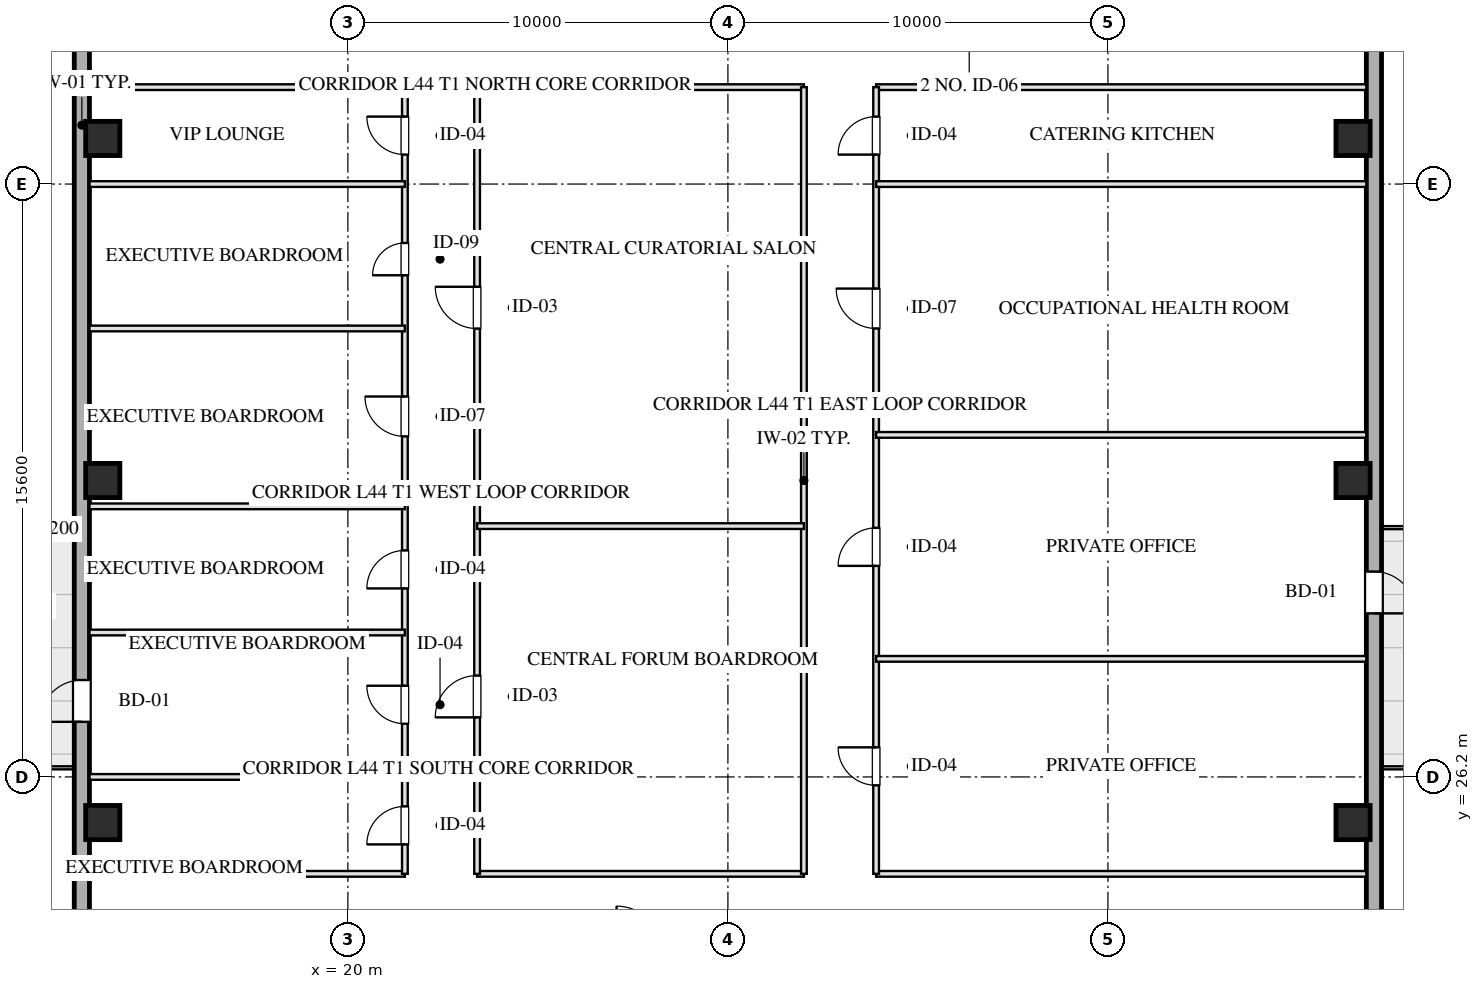
"""IFC4 building model, lengths in metres.
Left out: names, types, materials, properties, quantities, classifications, styles, units other than length and angle.
Written with IfcOpenShell. Run it as: python <this file> out.ifc"""

import sys

from ifc_helpers import new_model, si_unit, direction, frame, frame_2d, origin, origin_2d, place, context, subcontext, project, spatial, rectangle, hollow_rectangle, extrude, element, fill, save


model = new_model("IFC4")
c1 = context("Model", 3, precision=1e-05, world=origin(), true_north=direction((0.0, 1.0)))
c2 = subcontext(c1, "Body", "Model", "MODEL_VIEW")
j1 = project(units=[si_unit("LENGTHUNIT", "METRE"), si_unit("PLANEANGLEUNIT", "RADIAN")], contexts=[c1])
p1 = place(None, origin())
s1 = spatial("IfcSite", under=j1, at=p1, CompositionType="ELEMENT")
p2 = place(p1, origin())
s2 = spatial("IfcBuilding", under=s1, at=p2, CompositionType="ELEMENT")
p3 = place(p2, frame((0.0, 0.0, 166.75)))
s3 = spatial("IfcBuildingStorey", under=s2, at=p3, CompositionType="ELEMENT", Elevation=166.75)
for number, where, z_axis, x_axis in (
    (1, (13.55, 25.0, 0.0), (0.0, 0.0, 1.0), (1.0, 0.0, 0.0)),
    (2, (13.55, 34.0, 0.0), (0.0, 0.0, 1.0), (1.0, 0.0, 0.0)),
    (3, (13.55, 43.0, 0.0), (0.0, 0.0, 1.0), (1.0, 0.0, 0.0)),
    (4, (46.45, 25.0, 0.0), (0.0, 0.0, 1.0), (1.0, 0.0, 0.0)),
    (5, (46.45, 34.0, 0.0), (0.0, 0.0, 1.0), (1.0, 0.0, 0.0)),
    (6, (46.45, 43.0, 0.0), (0.0, 0.0, 1.0), (1.0, 0.0, 0.0)),
):
    element("IfcColumn", number, at=place(p3, frame(where, z_axis=z_axis, x_axis=x_axis)), inside=s3, PredefinedType="COLUMN", context=c2, shape_type="SweptSolid", body=[
        extrude(hollow_rectangle(XDim=0.9, YDim=0.9, WallThickness=0.032, at=origin_2d()), origin(), (0.0, 0.0, 1.0), 3.451),
    ])
p4 = place(p3, frame((13.0, 10.8, 0.0), z_axis=(0.0, 0.0, 1.0), x_axis=(0.0, 1.0, 0.0)))
e7 = element("IfcWall", 7, at=p4, inside=s3, PredefinedType="SOLIDWALL", context=c2, shape_type="SweptSolid", body=[
    extrude(rectangle(XDim=46.4, YDim=0.4, at=frame_2d((23.2, 0.0))), origin(), (0.0, 0.0, 1.0), 2.61),
])
p5 = place(p4, frame((16.85, 0.0, 0.0)))
e8 = element("IfcOpeningElement", 8, at=p5, cuts=e7, PredefinedType="OPENING", context=c2, shape_type="SweptSolid", body=[
    extrude(rectangle(XDim=1.1, YDim=2.15, at=frame_2d((0.55, 1.075))), frame((0.0, 0.21, 0.0), z_axis=(0.0, -1.0, 0.0), x_axis=(1.0, 0.0, 0.0)), (0.0, 0.0, 1.0), 0.42),
])
p6 = place(p3, frame((47.0, 57.2, 0.0), z_axis=(0.0, 0.0, 1.0), x_axis=(0.0, -1.0, 0.0)))
e9 = element("IfcWall", 9, at=p6, inside=s3, PredefinedType="SOLIDWALL", context=c2, shape_type="SweptSolid", body=[
    extrude(rectangle(XDim=46.4, YDim=0.4, at=frame_2d((23.2, 0.0))), origin(), (0.0, 0.0, 1.0), 2.61),
])
p7 = place(p6, frame((25.596, 0.0, 0.0)))
e10 = element("IfcOpeningElement", 10, at=p7, cuts=e9, PredefinedType="OPENING", context=c2, shape_type="SweptSolid", body=[
    extrude(rectangle(XDim=1.1, YDim=2.15, at=frame_2d((0.55, 1.075))), frame((0.0, 0.21, 0.0), z_axis=(0.0, -1.0, 0.0), x_axis=(1.0, 0.0, 0.0)), (0.0, 0.0, 1.0), 0.42),
])
p8 = place(p3, frame((13.2, 23.65, 0.0), z_axis=(0.0, 0.0, 1.0), x_axis=(1.0, 0.0, 0.0)))
e11 = element("IfcWall", 11, at=p8, inside=s3, PredefinedType="PARTITIONING", context=c2, shape_type="SweptSolid", body=[
    extrude(rectangle(XDim=8.3, YDim=0.15, at=frame_2d((4.15, 0.0))), origin(), (0.0, 0.0, 1.0), 3.175),
])
p9 = place(p3, frame((23.4, 23.65, 0.0), z_axis=(0.0, 0.0, 1.0), x_axis=(1.0, 0.0, 0.0)))
e12 = element("IfcWall", 12, at=p9, inside=s3, PredefinedType="PARTITIONING", context=c2, shape_type="SweptSolid", body=[
    extrude(rectangle(XDim=8.6, YDim=0.15, at=frame_2d((4.3, 0.0))), origin(), (0.0, 0.0, 1.0), 3.175),
])
p10 = place(p3, frame((33.9, 23.65, 0.0), z_axis=(0.0, 0.0, 1.0), x_axis=(1.0, 0.0, 0.0)))
e13 = element("IfcWall", 13, at=p10, inside=s3, PredefinedType="PARTITIONING", context=c2, shape_type="SweptSolid", body=[
    extrude(rectangle(XDim=12.9, YDim=0.15, at=frame_2d((6.45, 0.0))), origin(), (0.0, 0.0, 1.0), 3.175),
])
p11 = place(p3, frame((13.2, 44.35, 0.0), z_axis=(0.0, 0.0, 1.0), x_axis=(1.0, 0.0, 0.0)))
e14 = element("IfcWall", 14, at=p11, inside=s3, PredefinedType="PARTITIONING", context=c2, shape_type="SweptSolid", body=[
    extrude(rectangle(XDim=8.3, YDim=0.15, at=frame_2d((4.15, 0.0))), origin(), (0.0, 0.0, 1.0), 3.175),
])
p12 = place(p3, frame((23.4, 44.35, 0.0), z_axis=(0.0, 0.0, 1.0), x_axis=(1.0, 0.0, 0.0)))
e15 = element("IfcWall", 15, at=p12, inside=s3, PredefinedType="PARTITIONING", context=c2, shape_type="SweptSolid", body=[
    extrude(rectangle(XDim=8.6, YDim=0.15, at=frame_2d((4.3, 0.0))), origin(), (0.0, 0.0, 1.0), 3.175),
])
p13 = place(p3, frame((33.9, 44.35, 0.0), z_axis=(0.0, 0.0, 1.0), x_axis=(1.0, 0.0, 0.0)))
e16 = element("IfcWall", 16, at=p13, inside=s3, PredefinedType="PARTITIONING", context=c2, shape_type="SweptSolid", body=[
    extrude(rectangle(XDim=12.9, YDim=0.15, at=frame_2d((6.45, 0.0))), origin(), (0.0, 0.0, 1.0), 3.175),
])
p14 = place(p3, frame((21.5, 23.65, 0.0), z_axis=(0.0, 0.0, 1.0), x_axis=(0.0, 1.0, 0.0)))
e17 = element("IfcWall", 17, at=p14, inside=s3, PredefinedType="PARTITIONING", context=c2, shape_type="SweptSolid", body=[
    extrude(rectangle(XDim=20.7, YDim=0.15, at=frame_2d((10.35, 0.0))), origin(), (0.0, 0.0, 1.0), 3.175),
])
p15 = place(p14, frame((0.775, 0.0, 0.0)))
e18 = element("IfcOpeningElement", 18, at=p15, cuts=e17, PredefinedType="OPENING", context=c2, shape_type="SweptSolid", body=[
    extrude(rectangle(XDim=1.0, YDim=2.05, at=frame_2d((0.5, 1.025))), frame((0.0, 0.085, 0.0), z_axis=(0.0, -1.0, 0.0), x_axis=(1.0, 0.0, 0.0)), (0.0, 0.0, 1.0), 0.17),
])
p16 = place(p14, frame((3.95, 0.0, 0.0)))
e19 = element("IfcOpeningElement", 19, at=p16, cuts=e17, PredefinedType="OPENING", context=c2, shape_type="SweptSolid", body=[
    extrude(rectangle(XDim=1.0, YDim=2.05, at=frame_2d((0.5, 1.025))), frame((0.0, 0.085, 0.0), z_axis=(0.0, -1.0, 0.0), x_axis=(1.0, 0.0, 0.0)), (0.0, 0.0, 1.0), 0.17),
])
p17 = place(p14, frame((7.51, 0.0, 0.0)))
e20 = element("IfcOpeningElement", 20, at=p17, cuts=e17, PredefinedType="OPENING", context=c2, shape_type="SweptSolid", body=[
    extrude(rectangle(XDim=1.0, YDim=2.05, at=frame_2d((0.5, 1.025))), frame((0.0, 0.085, 0.0), z_axis=(0.0, -1.0, 0.0), x_axis=(1.0, 0.0, 0.0)), (0.0, 0.0, 1.0), 0.17),
])
p18 = place(p14, frame((11.51, 0.0, 0.0)))
e21 = element("IfcOpeningElement", 21, at=p18, cuts=e17, PredefinedType="OPENING", context=c2, shape_type="SweptSolid", body=[
    extrude(rectangle(XDim=1.05, YDim=2.05, at=frame_2d((0.525, 1.025))), frame((0.0, 0.085, 0.0), z_axis=(0.0, -1.0, 0.0), x_axis=(1.0, 0.0, 0.0)), (0.0, 0.0, 1.0), 0.17),
])
p19 = place(p14, frame((15.75, 0.0, 0.0)))
e22 = element("IfcOpeningElement", 22, at=p19, cuts=e17, PredefinedType="OPENING", context=c2, shape_type="SweptSolid", body=[
    extrude(rectangle(XDim=0.85, YDim=2.05, at=frame_2d((0.425, 1.025))), frame((0.0, 0.085, 0.0), z_axis=(0.0, -1.0, 0.0), x_axis=(1.0, 0.0, 0.0)), (0.0, 0.0, 1.0), 0.17),
])
p20 = place(p14, frame((18.925, 0.0, 0.0)))
e23 = element("IfcOpeningElement", 23, at=p20, cuts=e17, PredefinedType="OPENING", context=c2, shape_type="SweptSolid", body=[
    extrude(rectangle(XDim=1.0, YDim=2.05, at=frame_2d((0.5, 1.025))), frame((0.0, 0.085, 0.0), z_axis=(0.0, -1.0, 0.0), x_axis=(1.0, 0.0, 0.0)), (0.0, 0.0, 1.0), 0.17),
])
p21 = place(p3, frame((23.4, 23.65, 0.0), z_axis=(0.0, 0.0, 1.0), x_axis=(0.0, 1.0, 0.0)))
e24 = element("IfcWall", 24, at=p21, inside=s3, PredefinedType="PARTITIONING", context=c2, shape_type="SweptSolid", body=[
    extrude(rectangle(XDim=20.7, YDim=0.15, at=frame_2d((10.35, 0.0))), origin(), (0.0, 0.0, 1.0), 3.175),
])
p22 = place(p21, frame((4.117, 0.0, 0.0)))
e25 = element("IfcOpeningElement", 25, at=p22, cuts=e24, PredefinedType="OPENING", context=c2, shape_type="SweptSolid", body=[
    extrude(rectangle(XDim=1.1, YDim=2.05, at=frame_2d((0.55, 1.025))), frame((0.0, 0.085, 0.0), z_axis=(0.0, -1.0, 0.0), x_axis=(1.0, 0.0, 0.0)), (0.0, 0.0, 1.0), 0.17),
])
p23 = place(p21, frame((14.347, 0.0, 0.0)))
e26 = element("IfcOpeningElement", 26, at=p23, cuts=e24, PredefinedType="OPENING", context=c2, shape_type="SweptSolid", body=[
    extrude(rectangle(XDim=1.1, YDim=2.05, at=frame_2d((0.55, 1.025))), frame((0.0, 0.085, 0.0), z_axis=(0.0, -1.0, 0.0), x_axis=(1.0, 0.0, 0.0)), (0.0, 0.0, 1.0), 0.17),
])
p24 = place(p3, frame((32.0, 23.65, 0.0), z_axis=(0.0, 0.0, 1.0), x_axis=(0.0, 1.0, 0.0)))
e27 = element("IfcWall", 27, at=p24, inside=s3, PredefinedType="PARTITIONING", context=c2, shape_type="SweptSolid", body=[
    extrude(rectangle(XDim=20.7, YDim=0.15, at=frame_2d((10.35, 0.0))), origin(), (0.0, 0.0, 1.0), 3.175),
])
p25 = place(p3, frame((33.9, 23.65, 0.0), z_axis=(0.0, 0.0, 1.0), x_axis=(0.0, 1.0, 0.0)))
e28 = element("IfcWall", 28, at=p25, inside=s3, PredefinedType="PARTITIONING", context=c2, shape_type="SweptSolid", body=[
    extrude(rectangle(XDim=20.7, YDim=0.15, at=frame_2d((10.35, 0.0))), origin(), (0.0, 0.0, 1.0), 3.175),
])
p26 = place(p25, frame((2.329, 0.0, 0.0)))
e29 = element("IfcOpeningElement", 29, at=p26, cuts=e28, PredefinedType="OPENING", context=c2, shape_type="SweptSolid", body=[
    extrude(rectangle(XDim=1.0, YDim=2.05, at=frame_2d((0.5, 1.025))), frame((0.0, 0.085, 0.0), z_axis=(0.0, -1.0, 0.0), x_axis=(1.0, 0.0, 0.0)), (0.0, 0.0, 1.0), 0.17),
])
p27 = place(p25, frame((8.104, 0.0, 0.0)))
e30 = element("IfcOpeningElement", 30, at=p27, cuts=e28, PredefinedType="OPENING", context=c2, shape_type="SweptSolid", body=[
    extrude(rectangle(XDim=1.0, YDim=2.05, at=frame_2d((0.5, 1.025))), frame((0.0, 0.085, 0.0), z_axis=(0.0, -1.0, 0.0), x_axis=(1.0, 0.0, 0.0)), (0.0, 0.0, 1.0), 0.17),
])
p28 = place(p25, frame((14.35, 0.0, 0.0)))
e31 = element("IfcOpeningElement", 31, at=p28, cuts=e28, PredefinedType="OPENING", context=c2, shape_type="SweptSolid", body=[
    extrude(rectangle(XDim=1.05, YDim=2.05, at=frame_2d((0.525, 1.025))), frame((0.0, 0.085, 0.0), z_axis=(0.0, -1.0, 0.0), x_axis=(1.0, 0.0, 0.0)), (0.0, 0.0, 1.0), 0.17),
])
p29 = place(p25, frame((18.925, 0.0, 0.0)))
e32 = element("IfcOpeningElement", 32, at=p29, cuts=e28, PredefinedType="OPENING", context=c2, shape_type="SweptSolid", body=[
    extrude(rectangle(XDim=1.0, YDim=2.05, at=frame_2d((0.5, 1.025))), frame((0.0, 0.085, 0.0), z_axis=(0.0, -1.0, 0.0), x_axis=(1.0, 0.0, 0.0)), (0.0, 0.0, 1.0), 0.17),
])
p30 = place(p3, frame((23.4, 32.8, 0.0), z_axis=(0.0, 0.0, 1.0), x_axis=(1.0, 0.0, 0.0)))
e33 = element("IfcWall", 33, at=p30, inside=s3, PredefinedType="PARTITIONING", context=c2, shape_type="SweptSolid", body=[
    extrude(rectangle(XDim=8.6, YDim=0.15, at=frame_2d((4.3, 0.0))), origin(), (0.0, 0.0, 1.0), 3.175),
])
for number, where, z_axis, x_axis in (
    (34, (13.2, 26.2, 0.0), (0.0, 0.0, 1.0), (1.0, 0.0, 0.0)),
    (35, (13.2, 30.0, 0.0), (0.0, 0.0, 1.0), (1.0, 0.0, 0.0)),
    (36, (13.2, 33.32, 0.0), (0.0, 0.0, 1.0), (1.0, 0.0, 0.0)),
    (37, (13.2, 38.0, 0.0), (0.0, 0.0, 1.0), (1.0, 0.0, 0.0)),
    (38, (13.2, 41.8, 0.0), (0.0, 0.0, 1.0), (1.0, 0.0, 0.0)),
):
    element("IfcWall", number, at=place(p3, frame(where, z_axis=z_axis, x_axis=x_axis)), inside=s3, PredefinedType="PARTITIONING", context=c2, shape_type="SweptSolid", body=[
        extrude(rectangle(XDim=8.3, YDim=0.15, at=frame_2d((4.15, 0.0))), origin(), (0.0, 0.0, 1.0), 3.175),
    ])
for number, where, z_axis, x_axis in (
    (39, (33.9, 29.307, 0.0), (0.0, 0.0, 1.0), (1.0, 0.0, 0.0)),
    (40, (33.9, 35.2, 0.0), (0.0, 0.0, 1.0), (1.0, 0.0, 0.0)),
    (41, (33.9, 41.8, 0.0), (0.0, 0.0, 1.0), (1.0, 0.0, 0.0)),
):
    element("IfcWall", number, at=place(p3, frame(where, z_axis=z_axis, x_axis=x_axis)), inside=s3, PredefinedType="PARTITIONING", context=c2, shape_type="SweptSolid", body=[
        extrude(rectangle(XDim=12.9, YDim=0.15, at=frame_2d((6.45, 0.0))), origin(), (0.0, 0.0, 1.0), 3.175),
    ])
p31 = place(p5, origin())
e42 = element("IfcDoor", 42, at=p31, inside=s3, OperationType="SINGLE_SWING_LEFT", PredefinedType="DOOR", context=c2, shape_type="SweptSolid", body=[
    extrude(rectangle(XDim=1.1, YDim=2.15, at=frame_2d((0.55, 1.075))), frame((0.0, 0.025, 0.0), z_axis=(0.0, -1.0, 0.0), x_axis=(1.0, 0.0, 0.0)), (0.0, 0.0, 1.0), 0.05),
])
fill(e8, e42)
p32 = place(p7, origin())
e43 = element("IfcDoor", 43, at=p32, inside=s3, OperationType="SINGLE_SWING_RIGHT", PredefinedType="DOOR", context=c2, shape_type="SweptSolid", body=[
    extrude(rectangle(XDim=1.1, YDim=2.15, at=frame_2d((0.55, 1.075))), frame((0.0, 0.025, 0.0), z_axis=(0.0, -1.0, 0.0), x_axis=(1.0, 0.0, 0.0)), (0.0, 0.0, 1.0), 0.05),
])
fill(e10, e43)
p33 = place(p15, origin())
e44 = element("IfcDoor", 44, at=p33, inside=s3, OperationType="SINGLE_SWING_LEFT", PredefinedType="DOOR", context=c2, shape_type="SweptSolid", body=[
    extrude(rectangle(XDim=1.0, YDim=2.05, at=frame_2d((0.5, 1.025))), frame((0.0, 0.025, 0.0), z_axis=(0.0, -1.0, 0.0), x_axis=(1.0, 0.0, 0.0)), (0.0, 0.0, 1.0), 0.05),
])
fill(e18, e44)
p34 = place(p16, origin())
e45 = element("IfcDoor", 45, at=p34, inside=s3, OperationType="SINGLE_SWING_RIGHT", PredefinedType="DOOR", context=c2, shape_type="SweptSolid", body=[
    extrude(rectangle(XDim=1.0, YDim=2.05, at=frame_2d((0.5, 1.025))), frame((0.0, 0.025, 0.0), z_axis=(0.0, -1.0, 0.0), x_axis=(1.0, 0.0, 0.0)), (0.0, 0.0, 1.0), 0.05),
])
fill(e19, e45)
p35 = place(p17, origin())
e46 = element("IfcDoor", 46, at=p35, inside=s3, OperationType="SINGLE_SWING_LEFT", PredefinedType="DOOR", context=c2, shape_type="SweptSolid", body=[
    extrude(rectangle(XDim=1.0, YDim=2.05, at=frame_2d((0.5, 1.025))), frame((0.0, 0.025, 0.0), z_axis=(0.0, -1.0, 0.0), x_axis=(1.0, 0.0, 0.0)), (0.0, 0.0, 1.0), 0.05),
])
fill(e20, e46)
p36 = place(p18, origin())
e47 = element("IfcDoor", 47, at=p36, inside=s3, OperationType="SINGLE_SWING_RIGHT", PredefinedType="DOOR", context=c2, shape_type="SweptSolid", body=[
    extrude(rectangle(XDim=1.05, YDim=2.05, at=frame_2d((0.525, 1.025))), frame((0.0, 0.025, 0.0), z_axis=(0.0, -1.0, 0.0), x_axis=(1.0, 0.0, 0.0)), (0.0, 0.0, 1.0), 0.05),
])
fill(e21, e47)
p37 = place(p19, origin())
e48 = element("IfcDoor", 48, at=p37, inside=s3, OperationType="SINGLE_SWING_LEFT", PredefinedType="DOOR", context=c2, shape_type="SweptSolid", body=[
    extrude(rectangle(XDim=0.85, YDim=2.05, at=frame_2d((0.425, 1.025))), frame((0.0, 0.025, 0.0), z_axis=(0.0, -1.0, 0.0), x_axis=(1.0, 0.0, 0.0)), (0.0, 0.0, 1.0), 0.05),
])
fill(e22, e48)
p38 = place(p20, origin())
e49 = element("IfcDoor", 49, at=p38, inside=s3, OperationType="SINGLE_SWING_RIGHT", PredefinedType="DOOR", context=c2, shape_type="SweptSolid", body=[
    extrude(rectangle(XDim=1.0, YDim=2.05, at=frame_2d((0.5, 1.025))), frame((0.0, 0.025, 0.0), z_axis=(0.0, -1.0, 0.0), x_axis=(1.0, 0.0, 0.0)), (0.0, 0.0, 1.0), 0.05),
])
fill(e23, e49)
p39 = place(p22, origin())
e50 = element("IfcDoor", 50, at=p39, inside=s3, OperationType="SINGLE_SWING_LEFT", PredefinedType="DOOR", context=c2, shape_type="SweptSolid", body=[
    extrude(rectangle(XDim=1.1, YDim=2.05, at=frame_2d((0.55, 1.025))), frame((0.0, 0.025, 0.0), z_axis=(0.0, -1.0, 0.0), x_axis=(1.0, 0.0, 0.0)), (0.0, 0.0, 1.0), 0.05),
])
fill(e25, e50)
p40 = place(p23, origin())
e51 = element("IfcDoor", 51, at=p40, inside=s3, OperationType="SINGLE_SWING_RIGHT", PredefinedType="DOOR", context=c2, shape_type="SweptSolid", body=[
    extrude(rectangle(XDim=1.1, YDim=2.05, at=frame_2d((0.55, 1.025))), frame((0.0, 0.025, 0.0), z_axis=(0.0, -1.0, 0.0), x_axis=(1.0, 0.0, 0.0)), (0.0, 0.0, 1.0), 0.05),
])
fill(e26, e51)
p41 = place(p26, origin())
e52 = element("IfcDoor", 52, at=p41, inside=s3, OperationType="SINGLE_SWING_RIGHT", PredefinedType="DOOR", context=c2, shape_type="SweptSolid", body=[
    extrude(rectangle(XDim=1.0, YDim=2.05, at=frame_2d((0.5, 1.025))), frame((0.0, 0.025, 0.0), z_axis=(0.0, -1.0, 0.0), x_axis=(1.0, 0.0, 0.0)), (0.0, 0.0, 1.0), 0.05),
])
fill(e29, e52)
p42 = place(p27, origin())
e53 = element("IfcDoor", 53, at=p42, inside=s3, OperationType="SINGLE_SWING_LEFT", PredefinedType="DOOR", context=c2, shape_type="SweptSolid", body=[
    extrude(rectangle(XDim=1.0, YDim=2.05, at=frame_2d((0.5, 1.025))), frame((0.0, 0.025, 0.0), z_axis=(0.0, -1.0, 0.0), x_axis=(1.0, 0.0, 0.0)), (0.0, 0.0, 1.0), 0.05),
])
fill(e30, e53)
p43 = place(p28, origin())
e54 = element("IfcDoor", 54, at=p43, inside=s3, OperationType="SINGLE_SWING_RIGHT", PredefinedType="DOOR", context=c2, shape_type="SweptSolid", body=[
    extrude(rectangle(XDim=1.05, YDim=2.05, at=frame_2d((0.525, 1.025))), frame((0.0, 0.025, 0.0), z_axis=(0.0, -1.0, 0.0), x_axis=(1.0, 0.0, 0.0)), (0.0, 0.0, 1.0), 0.05),
])
fill(e31, e54)
p44 = place(p29, origin())
e55 = element("IfcDoor", 55, at=p44, inside=s3, OperationType="SINGLE_SWING_LEFT", PredefinedType="DOOR", context=c2, shape_type="SweptSolid", body=[
    extrude(rectangle(XDim=1.0, YDim=2.05, at=frame_2d((0.5, 1.025))), frame((0.0, 0.025, 0.0), z_axis=(0.0, -1.0, 0.0), x_axis=(1.0, 0.0, 0.0)), (0.0, 0.0, 1.0), 0.05),
])
fill(e32, e55)
save(model, sys.argv[1])
